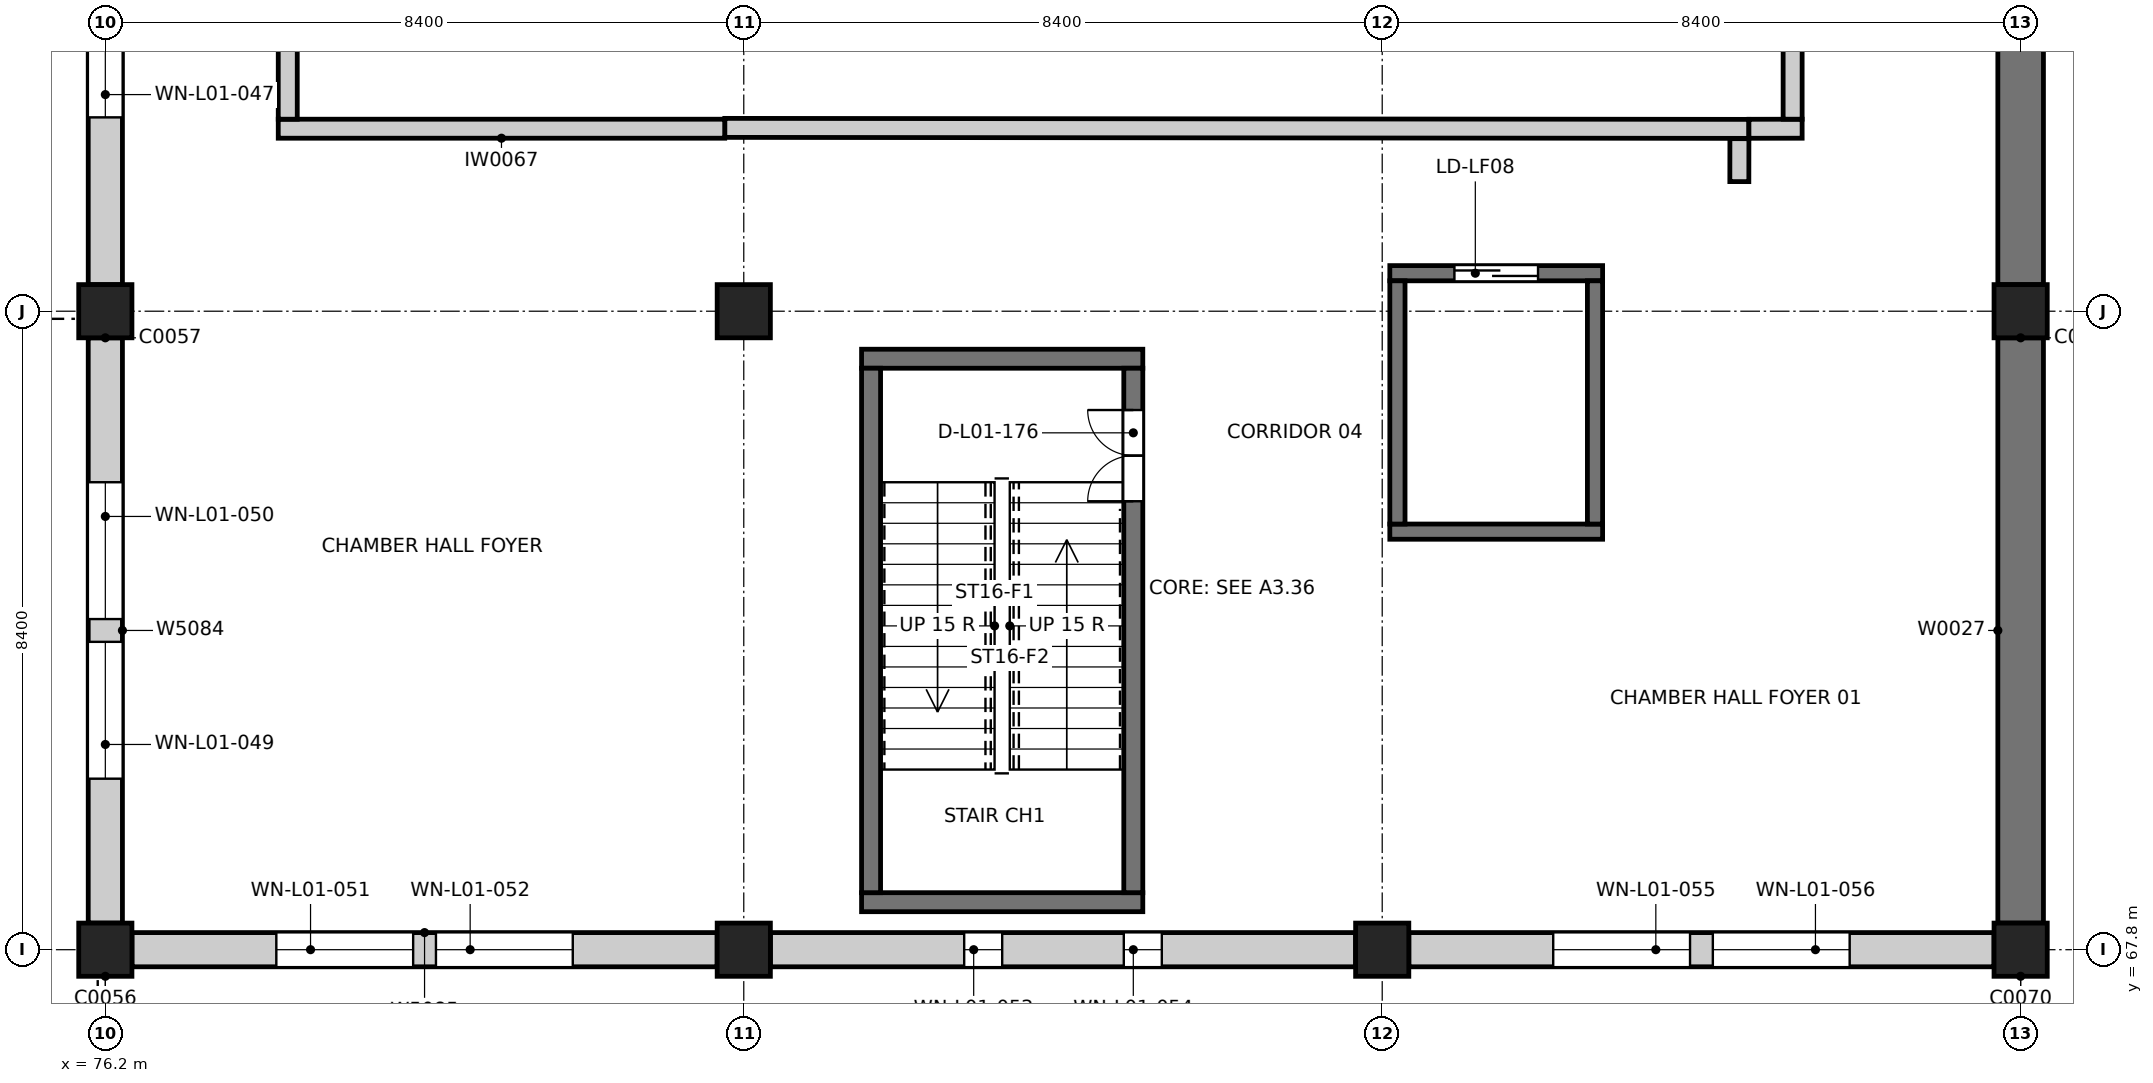
"""IFC4 building model, lengths in metres.
Left out: names, types, materials, properties, quantities, classifications, styles, units other than length and angle.
Written with IfcOpenShell. Run it as: python <this file> out.ifc"""

import sys

from ifc_helpers import new_model, si_unit, direction, frame, frame_2d, origin, origin_2d, place, context, subcontext, project, spatial, rectangle, extrude, element, fill, save


model = new_model("IFC4")
c1 = context("Model", 3, precision=1e-05, world=origin(), true_north=direction((0.0, 1.0)))
c2 = subcontext(c1, "Body", "Model", "MODEL_VIEW")
j1 = project(units=[si_unit("LENGTHUNIT", "METRE"), si_unit("PLANEANGLEUNIT", "RADIAN")], contexts=[c1])
p1 = place(None, origin())
s1 = spatial("IfcSite", under=j1, at=p1, CompositionType="ELEMENT")
p2 = place(p1, origin())
s2 = spatial("IfcBuilding", under=s1, at=p2, CompositionType="ELEMENT")
p3 = place(p2, frame((0.0, 0.0, 4.8)))
s3 = spatial("IfcBuildingStorey", under=s2, at=p3, CompositionType="ELEMENT", Elevation=4.8)
for number, where, z_axis, x_axis in (
    (1, (76.2, 67.8, 0.0), (0.0, 0.0, 1.0), (1.0, 0.0, 0.0)),
    (2, (76.2, 76.2, 0.0), (0.0, 0.0, 1.0), (1.0, 0.0, 0.0)),
    (3, (84.6, 67.8, 0.0), (0.0, 0.0, 1.0), (1.0, 0.0, 0.0)),
    (4, (84.6, 76.2, 0.0), (0.0, 0.0, 1.0), (1.0, 0.0, 0.0)),
    (5, (93.0, 67.8, 0.0), (0.0, 0.0, 1.0), (1.0, 0.0, 0.0)),
    (6, (101.4, 67.8, 0.0), (0.0, 0.0, 1.0), (1.0, 0.0, 0.0)),
    (7, (101.4, 76.2, 0.0), (0.0, 0.0, 1.0), (1.0, 0.0, 0.0)),
):
    element("IfcColumn", number, at=place(p3, frame(where, z_axis=z_axis, x_axis=x_axis)), inside=s3, PredefinedType="COLUMN", context=c2, shape_type="SweptSolid", body=[
        extrude(rectangle(XDim=0.7, YDim=0.7, at=origin_2d()), origin(), (0.0, 0.0, 1.0), 4.8),
    ])
p4 = place(p3, frame((101.4, 68.15, 0.0), z_axis=(0.0, 0.0, 1.0), x_axis=(0.0, 1.0, 0.0)))
e8 = element("IfcWall", 8, at=p4, inside=s3, PredefinedType="SOLIDWALL", context=c2, shape_type="SweptSolid", body=[
    extrude(rectangle(XDim=7.7, YDim=0.6, at=frame_2d((3.85, 0.0))), origin(), (0.0, 0.0, 1.0), 4.8),
])
p5 = place(p3, frame((101.4, 76.55, 0.0), z_axis=(0.0, 0.0, 1.0), x_axis=(0.0, 1.0, 0.0)))
e9 = element("IfcWall", 9, at=p5, inside=s3, PredefinedType="SOLIDWALL", context=c2, shape_type="SweptSolid", body=[
    extrude(rectangle(XDim=7.7, YDim=0.6, at=frame_2d((3.85, 0.0))), origin(), (0.0, 0.0, 1.0), 4.8),
])
for number, where, z_axis, x_axis in (
    (10, (86.15, 68.425, 0.0), (0.0, 0.0, 1.0), (1.0, 0.0, 0.0)),
    (11, (86.15, 75.575, 0.0), (0.0, 0.0, 1.0), (1.0, 0.0, 0.0)),
):
    element("IfcWall", number, at=place(p3, frame(where, z_axis=z_axis, x_axis=x_axis)), inside=s3, PredefinedType="SOLIDWALL", context=c2, shape_type="SweptSolid", body=[
        extrude(rectangle(XDim=3.7, YDim=0.25, at=frame_2d((1.85, 0.0))), origin(), (0.0, 0.0, 1.0), 4.8),
    ])
p6 = place(p3, frame((86.275, 68.55, 0.0), z_axis=(0.0, 0.0, 1.0), x_axis=(0.0, 1.0, 0.0)))
e12 = element("IfcWall", 12, at=p6, inside=s3, PredefinedType="SOLIDWALL", context=c2, shape_type="SweptSolid", body=[
    extrude(rectangle(XDim=6.9, YDim=0.25, at=frame_2d((3.45, 0.0))), origin(), (0.0, 0.0, 1.0), 4.8),
])
p7 = place(p3, frame((89.725, 68.55, 0.0), z_axis=(0.0, 0.0, 1.0), x_axis=(0.0, 1.0, 0.0)))
e13 = element("IfcWall", 13, at=p7, inside=s3, PredefinedType="SOLIDWALL", context=c2, shape_type="SweptSolid", body=[
    extrude(rectangle(XDim=6.9, YDim=0.25, at=frame_2d((3.45, 0.0))), origin(), (0.0, 0.0, 1.0), 4.8),
])
p8 = place(p7, frame((5.15, 0.0, 0.0)))
e14 = element("IfcOpeningElement", 14, at=p8, cuts=e13, PredefinedType="OPENING", context=c2, shape_type="SweptSolid", body=[
    extrude(rectangle(XDim=1.2, YDim=2.1, at=frame_2d((0.6, 1.05))), frame((0.0, 0.135, 0.0), z_axis=(0.0, -1.0, 0.0), x_axis=(1.0, 0.0, 0.0)), (0.0, 0.0, 1.0), 0.27),
])
p9 = place(p3, frame((93.1, 73.3, 0.0), z_axis=(0.0, 0.0, 1.0), x_axis=(1.0, 0.0, 0.0)))
e15 = element("IfcWall", 15, at=p9, inside=s3, PredefinedType="SOLIDWALL", context=c2, shape_type="SweptSolid", body=[
    extrude(rectangle(XDim=2.8, YDim=0.2, at=frame_2d((1.4, 0.0))), origin(), (0.0, 0.0, 1.0), 4.8),
])
p10 = place(p3, frame((93.1, 76.7, 0.0), z_axis=(0.0, 0.0, 1.0), x_axis=(1.0, 0.0, 0.0)))
e16 = element("IfcWall", 16, at=p10, inside=s3, PredefinedType="SOLIDWALL", context=c2, shape_type="SweptSolid", body=[
    extrude(rectangle(XDim=2.8, YDim=0.2, at=frame_2d((1.4, 0.0))), origin(), (0.0, 0.0, 1.0), 4.8),
])
p11 = place(p10, frame((0.85, 0.0, 0.0)))
e17 = element("IfcOpeningElement", 17, at=p11, cuts=e16, PredefinedType="OPENING", context=c2, shape_type="SweptSolid", body=[
    extrude(rectangle(XDim=1.1, YDim=2.1, at=frame_2d((0.55, 1.05))), frame((0.0, 0.11, 0.0), z_axis=(0.0, -1.0, 0.0), x_axis=(1.0, 0.0, 0.0)), (0.0, 0.0, 1.0), 0.22),
])
for number, where, z_axis, x_axis in (
    (18, (93.2, 73.4, 0.0), (0.0, 0.0, 1.0), (0.0, 1.0, 0.0)),
    (19, (95.8, 73.4, 0.0), (0.0, 0.0, 1.0), (0.0, 1.0, 0.0)),
):
    element("IfcWall", number, at=place(p3, frame(where, z_axis=z_axis, x_axis=x_axis)), inside=s3, PredefinedType="SOLIDWALL", context=c2, shape_type="SweptSolid", body=[
        extrude(rectangle(XDim=3.2, YDim=0.2, at=frame_2d((1.6, 0.0))), origin(), (0.0, 0.0, 1.0), 4.8),
    ])
p12 = place(p3, frame((84.35, 78.612, 0.0), z_axis=(0.0, 0.0, 1.0), x_axis=(0.999999521312, -0.000978455383, 0.0)))
e20 = element("IfcWall", 20, at=p12, inside=s3, PredefinedType="PARTITIONING", context=c2, shape_type="SweptSolid", body=[
    extrude(rectangle(XDim=13.474, YDim=0.25, at=frame_2d((6.737, 0.0))), origin(), (0.0, 0.0, 1.0), 3.8),
])
p13 = place(p3, frame((84.349, 78.601, 0.0), z_axis=(0.0, 0.0, 1.0), x_axis=(-1.0, 0.0, 0.0)))
e21 = element("IfcWall", 21, at=p13, inside=s3, PredefinedType="PARTITIONING", context=c2, shape_type="SweptSolid", body=[
    extrude(rectangle(XDim=5.874, YDim=0.25, at=frame_2d((2.937, 0.0))), origin(), (0.0, 0.0, 1.0), 3.8),
])
p14 = place(p3, frame((98.525, 78.601, 0.0), z_axis=(0.0, 0.0, 1.0), x_axis=(-0.999999026729, -0.001395185248, 0.0)))
e22 = element("IfcWall", 22, at=p14, inside=s3, PredefinedType="PARTITIONING", context=c2, shape_type="SweptSolid", body=[
    extrude(rectangle(XDim=0.7, YDim=0.25, at=frame_2d((0.35, 0.0))), origin(), (0.0, 0.0, 1.0), 4.6),
])
p15 = place(p3, frame((97.7, 78.47, 0.0), z_axis=(0.0, 0.0, 1.0), x_axis=(-0.001728605888, -0.99999850596, 0.0)))
e23 = element("IfcWall", 23, at=p15, inside=s3, PredefinedType="PARTITIONING", context=c2, shape_type="SweptSolid", body=[
    extrude(rectangle(XDim=0.565, YDim=0.25, at=frame_2d((0.282, 0.0))), origin(), (0.0, 0.0, 1.0), 4.6),
])
p16 = place(p3, frame((98.4, 88.375, 0.0), z_axis=(0.0, 0.0, 1.0), x_axis=(0.0, -1.0, 0.0)))
e24 = element("IfcWall", 24, at=p16, inside=s3, PredefinedType="PARTITIONING", context=c2, shape_type="SweptSolid", body=[
    extrude(rectangle(XDim=9.649, YDim=0.25, at=frame_2d((4.824, 0.0))), origin(), (0.0, 0.0, 1.0), 3.8),
])
p17 = place(p16, frame((1.984, 0.0, 0.0)))
e25 = element("IfcOpeningElement", 25, at=p17, cuts=e24, PredefinedType="OPENING", context=c2, shape_type="SweptSolid", body=[
    extrude(rectangle(XDim=1.8, YDim=2.4, at=frame_2d((0.9, 1.2))), frame((0.0, 0.135, 0.0), z_axis=(0.0, -1.0, 0.0), x_axis=(1.0, 0.0, 0.0)), (0.0, 0.0, 1.0), 0.27),
])
p18 = place(p16, frame((4.748, 0.0, 0.0)))
e26 = element("IfcOpeningElement", 26, at=p18, cuts=e24, PredefinedType="OPENING", context=c2, shape_type="SweptSolid", body=[
    extrude(rectangle(XDim=1.8, YDim=2.4, at=frame_2d((0.9, 1.2))), frame((0.0, 0.135, 0.0), z_axis=(0.0, -1.0, 0.0), x_axis=(1.0, 0.0, 0.0)), (0.0, 0.0, 1.0), 0.27),
])
p19 = place(p3, frame((78.6, 78.726, 0.0), z_axis=(0.0, 0.0, 1.0), x_axis=(0.0, 1.0, 0.0)))
e27 = element("IfcWall", 27, at=p19, inside=s3, PredefinedType="PARTITIONING", context=c2, shape_type="SweptSolid", body=[
    extrude(rectangle(XDim=11.899, YDim=0.25, at=frame_2d((5.949, 0.0))), origin(), (0.0, 0.0, 1.0), 3.8),
])
p20 = place(p3, frame((76.2, 84.25, 0.0), z_axis=(0.0, 0.0, 1.0), x_axis=(0.0, -1.0, 0.0)))
e28 = element("IfcWall", 28, at=p20, inside=s3, PredefinedType="SOLIDWALL", context=c2, shape_type="SweptSolid", body=[
    extrude(rectangle(XDim=7.7, YDim=0.45, at=frame_2d((3.85, 0.0))), origin(), (0.0, 0.0, 1.0), 3.8),
])
p21 = place(p20, frame((4.3, 0.0, 0.9)))
e29 = element("IfcOpeningElement", 29, at=p21, cuts=e28, PredefinedType="OPENING", context=c2, shape_type="SweptSolid", body=[
    extrude(rectangle(XDim=1.2, YDim=2.4, at=frame_2d((0.6, 1.2))), frame((0.0, 0.235, 0.0), z_axis=(0.0, -1.0, 0.0), x_axis=(1.0, 0.0, 0.0)), (0.0, 0.0, 1.0), 0.47),
])
p22 = place(p20, frame((2.2, 0.0, 0.9)))
e30 = element("IfcOpeningElement", 30, at=p22, cuts=e28, PredefinedType="OPENING", context=c2, shape_type="SweptSolid", body=[
    extrude(rectangle(XDim=1.2, YDim=2.4, at=frame_2d((0.6, 1.2))), frame((0.0, 0.235, 0.0), z_axis=(0.0, -1.0, 0.0), x_axis=(1.0, 0.0, 0.0)), (0.0, 0.0, 1.0), 0.47),
])
p23 = place(p3, frame((76.2, 75.85, 0.0), z_axis=(0.0, 0.0, 1.0), x_axis=(0.0, -1.0, 0.0)))
e31 = element("IfcWall", 31, at=p23, inside=s3, PredefinedType="SOLIDWALL", context=c2, shape_type="SweptSolid", body=[
    extrude(rectangle(XDim=7.7, YDim=0.45, at=frame_2d((3.85, 0.0))), origin(), (0.0, 0.0, 1.0), 3.8),
])
p24 = place(p23, frame((4.0, 0.0, 0.6)))
e32 = element("IfcOpeningElement", 32, at=p24, cuts=e31, PredefinedType="OPENING", context=c2, shape_type="SweptSolid", body=[
    extrude(rectangle(XDim=1.8, YDim=3.0, at=frame_2d((0.9, 1.5))), frame((0.0, 0.235, 0.0), z_axis=(0.0, -1.0, 0.0), x_axis=(1.0, 0.0, 0.0)), (0.0, 0.0, 1.0), 0.47),
])
p25 = place(p23, frame((1.9, 0.0, 0.6)))
e33 = element("IfcOpeningElement", 33, at=p25, cuts=e31, PredefinedType="OPENING", context=c2, shape_type="SweptSolid", body=[
    extrude(rectangle(XDim=1.8, YDim=3.0, at=frame_2d((0.9, 1.5))), frame((0.0, 0.235, 0.0), z_axis=(0.0, -1.0, 0.0), x_axis=(1.0, 0.0, 0.0)), (0.0, 0.0, 1.0), 0.47),
])
p26 = place(p3, frame((76.55, 67.8, 0.0), z_axis=(0.0, 0.0, 1.0), x_axis=(1.0, 0.0, 0.0)))
e34 = element("IfcWall", 34, at=p26, inside=s3, PredefinedType="SOLIDWALL", context=c2, shape_type="SweptSolid", body=[
    extrude(rectangle(XDim=7.7, YDim=0.45, at=frame_2d((3.85, 0.0))), origin(), (0.0, 0.0, 1.0), 3.8),
])
p27 = place(p26, frame((1.9, 0.0, 0.6)))
e35 = element("IfcOpeningElement", 35, at=p27, cuts=e34, PredefinedType="OPENING", context=c2, shape_type="SweptSolid", body=[
    extrude(rectangle(XDim=1.8, YDim=3.0, at=frame_2d((0.9, 1.5))), frame((0.0, 0.235, 0.0), z_axis=(0.0, -1.0, 0.0), x_axis=(1.0, 0.0, 0.0)), (0.0, 0.0, 1.0), 0.47),
])
p28 = place(p26, frame((4.0, 0.0, 0.6)))
e36 = element("IfcOpeningElement", 36, at=p28, cuts=e34, PredefinedType="OPENING", context=c2, shape_type="SweptSolid", body=[
    extrude(rectangle(XDim=1.8, YDim=3.0, at=frame_2d((0.9, 1.5))), frame((0.0, 0.235, 0.0), z_axis=(0.0, -1.0, 0.0), x_axis=(1.0, 0.0, 0.0)), (0.0, 0.0, 1.0), 0.47),
])
p29 = place(p3, frame((84.95, 67.8, 0.0), z_axis=(0.0, 0.0, 1.0), x_axis=(1.0, 0.0, 0.0)))
e37 = element("IfcWall", 37, at=p29, inside=s3, PredefinedType="SOLIDWALL", context=c2, shape_type="SweptSolid", body=[
    extrude(rectangle(XDim=7.7, YDim=0.45, at=frame_2d((3.85, 0.0))), origin(), (0.0, 0.0, 1.0), 3.8),
])
p30 = place(p29, frame((2.55, 0.0, 0.9)))
e38 = element("IfcOpeningElement", 38, at=p30, cuts=e37, PredefinedType="OPENING", context=c2, shape_type="SweptSolid", body=[
    extrude(rectangle(XDim=0.5, YDim=2.1, at=frame_2d((0.25, 1.05))), frame((0.0, 0.235, 0.0), z_axis=(0.0, -1.0, 0.0), x_axis=(1.0, 0.0, 0.0)), (0.0, 0.0, 1.0), 0.47),
])
p31 = place(p29, frame((4.65, 0.0, 0.9)))
e39 = element("IfcOpeningElement", 39, at=p31, cuts=e37, PredefinedType="OPENING", context=c2, shape_type="SweptSolid", body=[
    extrude(rectangle(XDim=0.5, YDim=2.1, at=frame_2d((0.25, 1.05))), frame((0.0, 0.235, 0.0), z_axis=(0.0, -1.0, 0.0), x_axis=(1.0, 0.0, 0.0)), (0.0, 0.0, 1.0), 0.47),
])
p32 = place(p3, frame((93.35, 67.8, 0.0), z_axis=(0.0, 0.0, 1.0), x_axis=(1.0, 0.0, 0.0)))
e40 = element("IfcWall", 40, at=p32, inside=s3, PredefinedType="SOLIDWALL", context=c2, shape_type="SweptSolid", body=[
    extrude(rectangle(XDim=7.7, YDim=0.45, at=frame_2d((3.85, 0.0))), origin(), (0.0, 0.0, 1.0), 3.8),
])
p33 = place(p32, frame((1.9, 0.0, 0.6)))
e41 = element("IfcOpeningElement", 41, at=p33, cuts=e40, PredefinedType="OPENING", context=c2, shape_type="SweptSolid", body=[
    extrude(rectangle(XDim=1.8, YDim=3.0, at=frame_2d((0.9, 1.5))), frame((0.0, 0.235, 0.0), z_axis=(0.0, -1.0, 0.0), x_axis=(1.0, 0.0, 0.0)), (0.0, 0.0, 1.0), 0.47),
])
p34 = place(p32, frame((4.0, 0.0, 0.6)))
e42 = element("IfcOpeningElement", 42, at=p34, cuts=e40, PredefinedType="OPENING", context=c2, shape_type="SweptSolid", body=[
    extrude(rectangle(XDim=1.8, YDim=3.0, at=frame_2d((0.9, 1.5))), frame((0.0, 0.235, 0.0), z_axis=(0.0, -1.0, 0.0), x_axis=(1.0, 0.0, 0.0)), (0.0, 0.0, 1.0), 0.47),
])
p35 = place(p8, origin())
e43 = element("IfcDoor", 43, at=p35, inside=s3, OperationType="DOUBLE_DOOR_SINGLE_SWING", PredefinedType="DOOR", context=c2, shape_type="SweptSolid", body=[
    extrude(rectangle(XDim=1.2, YDim=2.1, at=frame_2d((0.6, 1.05))), frame((0.0, 0.025, 0.0), z_axis=(0.0, -1.0, 0.0), x_axis=(1.0, 0.0, 0.0)), (0.0, 0.0, 1.0), 0.05),
])
fill(e14, e43)
p36 = place(p21, origin())
e44 = element("IfcWindow", 44, at=p36, inside=s3, PartitioningType="SINGLE_PANEL", PredefinedType="WINDOW", context=c2, shape_type="SweptSolid", body=[
    extrude(rectangle(XDim=1.2, YDim=2.4, at=frame_2d((0.6, 1.2))), frame((0.0, 0.135, 0.0), z_axis=(0.0, -1.0, 0.0), x_axis=(1.0, 0.0, 0.0)), (0.0, 0.0, 1.0), 0.06),
])
fill(e29, e44)
p37 = place(p24, origin())
e45 = element("IfcWindow", 45, at=p37, inside=s3, PartitioningType="DOUBLE_PANEL_VERTICAL", PredefinedType="WINDOW", context=c2, shape_type="SweptSolid", body=[
    extrude(rectangle(XDim=1.8, YDim=3.0, at=frame_2d((0.9, 1.5))), frame((0.0, 0.135, 0.0), z_axis=(0.0, -1.0, 0.0), x_axis=(1.0, 0.0, 0.0)), (0.0, 0.0, 1.0), 0.06),
])
fill(e32, e45)
p38 = place(p25, origin())
e46 = element("IfcWindow", 46, at=p38, inside=s3, PartitioningType="DOUBLE_PANEL_VERTICAL", PredefinedType="WINDOW", context=c2, shape_type="SweptSolid", body=[
    extrude(rectangle(XDim=1.8, YDim=3.0, at=frame_2d((0.9, 1.5))), frame((0.0, 0.135, 0.0), z_axis=(0.0, -1.0, 0.0), x_axis=(1.0, 0.0, 0.0)), (0.0, 0.0, 1.0), 0.06),
])
fill(e33, e46)
p39 = place(p27, origin())
e47 = element("IfcWindow", 47, at=p39, inside=s3, PartitioningType="DOUBLE_PANEL_VERTICAL", PredefinedType="WINDOW", context=c2, shape_type="SweptSolid", body=[
    extrude(rectangle(XDim=1.8, YDim=3.0, at=frame_2d((0.9, 1.5))), frame((0.0, 0.135, 0.0), z_axis=(0.0, -1.0, 0.0), x_axis=(1.0, 0.0, 0.0)), (0.0, 0.0, 1.0), 0.06),
])
fill(e35, e47)
p40 = place(p28, origin())
e48 = element("IfcWindow", 48, at=p40, inside=s3, PartitioningType="DOUBLE_PANEL_VERTICAL", PredefinedType="WINDOW", context=c2, shape_type="SweptSolid", body=[
    extrude(rectangle(XDim=1.8, YDim=3.0, at=frame_2d((0.9, 1.5))), frame((0.0, 0.135, 0.0), z_axis=(0.0, -1.0, 0.0), x_axis=(1.0, 0.0, 0.0)), (0.0, 0.0, 1.0), 0.06),
])
fill(e36, e48)
p41 = place(p30, origin())
e49 = element("IfcWindow", 49, at=p41, inside=s3, PartitioningType="SINGLE_PANEL", PredefinedType="WINDOW", context=c2, shape_type="SweptSolid", body=[
    extrude(rectangle(XDim=0.5, YDim=2.1, at=frame_2d((0.25, 1.05))), frame((0.0, 0.085, 0.0), z_axis=(0.0, -1.0, 0.0), x_axis=(1.0, 0.0, 0.0)), (0.0, 0.0, 1.0), 0.06),
])
fill(e38, e49)
p42 = place(p31, origin())
e50 = element("IfcWindow", 50, at=p42, inside=s3, PartitioningType="SINGLE_PANEL", PredefinedType="WINDOW", context=c2, shape_type="SweptSolid", body=[
    extrude(rectangle(XDim=0.5, YDim=2.1, at=frame_2d((0.25, 1.05))), frame((0.0, 0.085, 0.0), z_axis=(0.0, -1.0, 0.0), x_axis=(1.0, 0.0, 0.0)), (0.0, 0.0, 1.0), 0.06),
])
fill(e39, e50)
p43 = place(p33, origin())
e51 = element("IfcWindow", 51, at=p43, inside=s3, PartitioningType="DOUBLE_PANEL_VERTICAL", PredefinedType="WINDOW", context=c2, shape_type="SweptSolid", body=[
    extrude(rectangle(XDim=1.8, YDim=3.0, at=frame_2d((0.9, 1.5))), frame((0.0, 0.135, 0.0), z_axis=(0.0, -1.0, 0.0), x_axis=(1.0, 0.0, 0.0)), (0.0, 0.0, 1.0), 0.06),
])
fill(e41, e51)
p44 = place(p34, origin())
e52 = element("IfcWindow", 52, at=p44, inside=s3, PartitioningType="DOUBLE_PANEL_VERTICAL", PredefinedType="WINDOW", context=c2, shape_type="SweptSolid", body=[
    extrude(rectangle(XDim=1.8, YDim=3.0, at=frame_2d((0.9, 1.5))), frame((0.0, 0.135, 0.0), z_axis=(0.0, -1.0, 0.0), x_axis=(1.0, 0.0, 0.0)), (0.0, 0.0, 1.0), 0.06),
])
fill(e42, e52)
p45 = place(p11, origin())
e53 = element("IfcDoor", 53, at=p45, inside=s3, OperationType="SLIDING_TO_LEFT", PredefinedType="DOOR", context=c2, shape_type="SweptSolid", body=[
    extrude(rectangle(XDim=1.1, YDim=2.1, at=frame_2d((0.55, 1.05))), frame((0.0, 0.025, 0.0), z_axis=(0.0, -1.0, 0.0), x_axis=(1.0, 0.0, 0.0)), (0.0, 0.0, 1.0), 0.05),
])
fill(e17, e53)
save(model, sys.argv[1])
